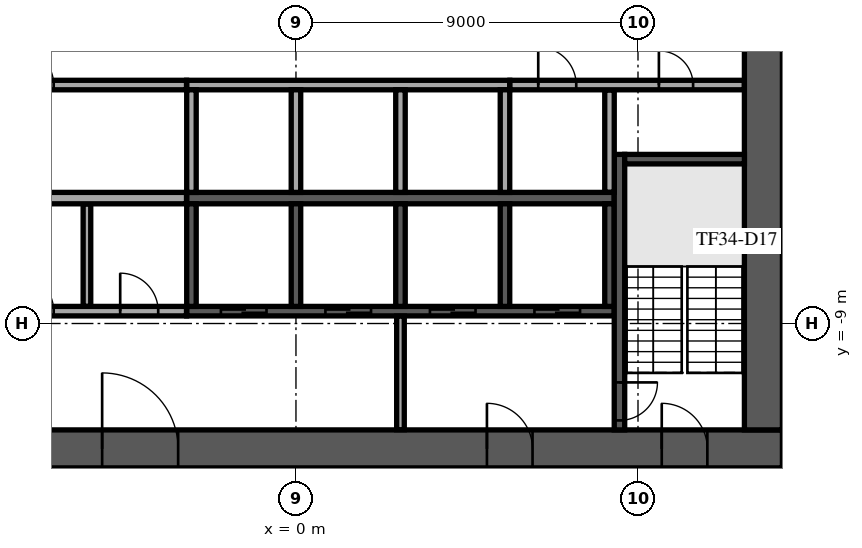
"""IFC4 building model, lengths in metres.
Left out: names, types, materials, properties, quantities, classifications, styles, units other than length and angle.
Written with IfcOpenShell. Run it as: python <this file> out.ifc"""

import sys

from ifc_helpers import new_model, si_unit, direction, frame, frame_2d, origin, place, context, subcontext, project, spatial, rectangle, extrude, element, fill, save


model = new_model("IFC4")
c1 = context("Model", 3, precision=1e-05, world=origin(), true_north=direction((0.0, 1.0)))
c2 = subcontext(c1, "Body", "Model", "MODEL_VIEW")
j1 = project(units=[si_unit("LENGTHUNIT", "METRE"), si_unit("PLANEANGLEUNIT", "RADIAN")], contexts=[c1])
p1 = place(None, origin())
s1 = spatial("IfcSite", under=j1, at=p1, CompositionType="ELEMENT")
p2 = place(p1, origin())
s2 = spatial("IfcBuilding", under=s1, at=p2, CompositionType="ELEMENT")
p3 = place(p2, frame((0.0, 0.0, 147.7)))
s3 = spatial("IfcBuildingStorey", under=s2, at=p3, CompositionType="ELEMENT", Elevation=147.7)
p4 = place(p3, frame((-12.8, -12.3, 0.0), z_axis=(0.0, 0.0, 1.0), x_axis=(1.0, 0.0, 0.0)))
e1 = element("IfcWall", 1, at=p4, inside=s3, PredefinedType="SHEAR", context=c2, shape_type="SweptSolid", body=[
    extrude(rectangle(XDim=25.6, YDim=1.0, at=frame_2d((12.8, 0.0))), origin(), (0.0, 0.0, 1.0), 3.6),
])
p5 = place(p4, frame((7.7, 0.0, 0.0)))
e2 = element("IfcOpeningElement", 2, at=p5, cuts=e1, PredefinedType="OPENING", context=c2, shape_type="SweptSolid", body=[
    extrude(rectangle(XDim=2.0, YDim=2.1, at=frame_2d((1.0, 1.05))), frame((0.0, 0.51, 0.0), z_axis=(0.0, -1.0, 0.0), x_axis=(1.0, 0.0, 0.0)), (0.0, 0.0, 1.0), 1.02),
])
p6 = place(p4, frame((17.825, 0.0, 0.0)))
e3 = element("IfcOpeningElement", 3, at=p6, cuts=e1, PredefinedType="OPENING", context=c2, shape_type="SweptSolid", body=[
    extrude(rectangle(XDim=1.2, YDim=2.1, at=frame_2d((0.6, 1.05))), frame((0.0, 0.51, 0.0), z_axis=(0.0, -1.0, 0.0), x_axis=(1.0, 0.0, 0.0)), (0.0, 0.0, 1.0), 1.02),
])
p7 = place(p4, frame((1.975, 0.0, 0.0)))
e4 = element("IfcOpeningElement", 4, at=p7, cuts=e1, PredefinedType="OPENING", context=c2, shape_type="SweptSolid", body=[
    extrude(rectangle(XDim=1.2, YDim=2.1, at=frame_2d((0.6, 1.05))), frame((0.0, 0.51, 0.0), z_axis=(0.0, -1.0, 0.0), x_axis=(1.0, 0.0, 0.0)), (0.0, 0.0, 1.0), 1.02),
])
p8 = place(p4, frame((22.425, 0.0, 0.0)))
e5 = element("IfcOpeningElement", 5, at=p8, cuts=e1, PredefinedType="OPENING", context=c2, shape_type="SweptSolid", body=[
    extrude(rectangle(XDim=1.2, YDim=2.1, at=frame_2d((0.6, 1.05))), frame((0.0, 0.51, 0.0), z_axis=(0.0, -1.0, 0.0), x_axis=(1.0, 0.0, 0.0)), (0.0, 0.0, 1.0), 1.02),
])
p9 = place(p3, frame((12.3, -11.8, 0.0), z_axis=(0.0, 0.0, 1.0), x_axis=(0.0, 1.0, 0.0)))
e6 = element("IfcWall", 6, at=p9, inside=s3, PredefinedType="SHEAR", context=c2, shape_type="SweptSolid", body=[
    extrude(rectangle(XDim=23.6, YDim=1.0, at=frame_2d((11.8, 0.0))), origin(), (0.0, 0.0, 1.0), 3.6),
])
p10 = place(p9, frame((10.6, 0.0, 0.0)))
e7 = element("IfcOpeningElement", 7, at=p10, cuts=e6, PredefinedType="OPENING", context=c2, shape_type="SweptSolid", body=[
    extrude(rectangle(XDim=2.4, YDim=2.4, at=frame_2d((1.2, 1.2))), frame((0.0, 0.51, 0.0), z_axis=(0.0, -1.0, 0.0), x_axis=(1.0, 0.0, 0.0)), (0.0, 0.0, 1.0), 1.02),
])
p11 = place(p3, frame((-2.875, -5.7, 0.0), z_axis=(0.0, 0.0, 1.0), x_axis=(1.0, 0.0, 0.0)))
e8 = element("IfcWall", 8, at=p11, inside=s3, PredefinedType="SOLIDWALL", context=c2, shape_type="SweptSolid", body=[
    extrude(rectangle(XDim=11.25, YDim=0.3, at=frame_2d((5.625, 0.0))), origin(), (0.0, 0.0, 1.0), 3.6),
])
p12 = place(p3, frame((-2.875, -2.725, 0.0), z_axis=(0.0, 0.0, 1.0), x_axis=(1.0, 0.0, 0.0)))
e9 = element("IfcWall", 9, at=p12, inside=s3, PredefinedType="SOLIDWALL", context=c2, shape_type="SweptSolid", body=[
    extrude(rectangle(XDim=8.5, YDim=0.25, at=frame_2d((4.25, 0.0))), origin(), (0.0, 0.0, 1.0), 3.6),
])
for number, where, z_axis, x_axis in (
    (10, (-2.75, -5.55, 0.0), (0.0, 0.0, 1.0), (0.0, 1.0, 0.0)),
    (11, (0.0, -5.55, 0.0), (0.0, 0.0, 1.0), (0.0, 1.0, 0.0)),
    (12, (2.75, -5.55, 0.0), (0.0, 0.0, 1.0), (0.0, 1.0, 0.0)),
    (13, (5.5, -5.55, 0.0), (0.0, 0.0, 1.0), (0.0, 1.0, 0.0)),
):
    element("IfcWall", number, at=place(p3, frame(where, z_axis=z_axis, x_axis=x_axis)), inside=s3, PredefinedType="SOLIDWALL", context=c2, shape_type="SweptSolid", body=[
        extrude(rectangle(XDim=2.7, YDim=0.25, at=frame_2d((1.35, 0.0))), origin(), (0.0, 0.0, 1.0), 3.6),
    ])
p13 = place(p3, frame((-2.875, -8.675, 0.0), z_axis=(0.0, 0.0, 1.0), x_axis=(1.0, 0.0, 0.0)))
e14 = element("IfcWall", 14, at=p13, inside=s3, PredefinedType="SOLIDWALL", context=c2, shape_type="SweptSolid", body=[
    extrude(rectangle(XDim=11.25, YDim=0.25, at=frame_2d((5.625, 0.0))), origin(), (0.0, 0.0, 1.0), 3.6),
])
p14 = place(p13, frame((0.9, 0.0, 0.0)))
e15 = element("IfcOpeningElement", 15, at=p14, cuts=e14, PredefinedType="OPENING", context=c2, shape_type="SweptSolid", body=[
    extrude(rectangle(XDim=1.2, YDim=2.1, at=frame_2d((0.6, 1.05))), frame((0.0, 0.135, 0.0), z_axis=(0.0, -1.0, 0.0), x_axis=(1.0, 0.0, 0.0)), (0.0, 0.0, 1.0), 0.27),
])
p15 = place(p13, frame((3.65, 0.0, 0.0)))
e16 = element("IfcOpeningElement", 16, at=p15, cuts=e14, PredefinedType="OPENING", context=c2, shape_type="SweptSolid", body=[
    extrude(rectangle(XDim=1.2, YDim=2.1, at=frame_2d((0.6, 1.05))), frame((0.0, 0.135, 0.0), z_axis=(0.0, -1.0, 0.0), x_axis=(1.0, 0.0, 0.0)), (0.0, 0.0, 1.0), 0.27),
])
p16 = place(p13, frame((6.4, 0.0, 0.0)))
e17 = element("IfcOpeningElement", 17, at=p16, cuts=e14, PredefinedType="OPENING", context=c2, shape_type="SweptSolid", body=[
    extrude(rectangle(XDim=1.2, YDim=2.1, at=frame_2d((0.6, 1.05))), frame((0.0, 0.135, 0.0), z_axis=(0.0, -1.0, 0.0), x_axis=(1.0, 0.0, 0.0)), (0.0, 0.0, 1.0), 0.27),
])
p17 = place(p13, frame((9.15, 0.0, 0.0)))
e18 = element("IfcOpeningElement", 18, at=p17, cuts=e14, PredefinedType="OPENING", context=c2, shape_type="SweptSolid", body=[
    extrude(rectangle(XDim=1.2, YDim=2.1, at=frame_2d((0.6, 1.05))), frame((0.0, 0.135, 0.0), z_axis=(0.0, -1.0, 0.0), x_axis=(1.0, 0.0, 0.0)), (0.0, 0.0, 1.0), 0.27),
])
for number, where, z_axis, x_axis in (
    (19, (-2.75, -8.55, 0.0), (0.0, 0.0, 1.0), (0.0, 1.0, 0.0)),
    (20, (0.0, -8.55, 0.0), (0.0, 0.0, 1.0), (0.0, 1.0, 0.0)),
    (21, (2.75, -8.55, 0.0), (0.0, 0.0, 1.0), (0.0, 1.0, 0.0)),
    (22, (5.5, -8.55, 0.0), (0.0, 0.0, 1.0), (0.0, 1.0, 0.0)),
    (23, (8.25, -8.55, 0.0), (0.0, 0.0, 1.0), (0.0, 1.0, 0.0)),
):
    element("IfcWall", number, at=place(p3, frame(where, z_axis=z_axis, x_axis=x_axis)), inside=s3, PredefinedType="SOLIDWALL", context=c2, shape_type="SweptSolid", body=[
        extrude(rectangle(XDim=2.7, YDim=0.25, at=frame_2d((1.35, 0.0))), origin(), (0.0, 0.0, 1.0), 3.6),
    ])
p18 = place(p3, frame((8.512, -4.55, 0.0), z_axis=(0.0, 0.0, 1.0), x_axis=(0.0, -1.0, 0.0)))
e24 = element("IfcWall", 24, at=p18, inside=s3, PredefinedType="SOLIDWALL", context=c2, shape_type="SweptSolid", body=[
    extrude(rectangle(XDim=7.25, YDim=0.275, at=frame_2d((3.625, 0.0))), origin(), (0.0, 0.0, 1.0), 3.6),
])
p19 = place(p18, frame((6.0, 0.0, 0.0)))
e25 = element("IfcOpeningElement", 25, at=p19, cuts=e24, PredefinedType="OPENING", context=c2, shape_type="SweptSolid", body=[
    extrude(rectangle(XDim=1.0, YDim=2.1, at=frame_2d((0.5, 1.05))), frame((0.0, 0.147, 0.0), z_axis=(0.0, -1.0, 0.0), x_axis=(1.0, 0.0, 0.0)), (0.0, 0.0, 1.0), 0.295),
])
p20 = place(p3, frame((8.65, -4.675, 0.0), z_axis=(0.0, 0.0, 1.0), x_axis=(1.0, 0.0, 0.0)))
e26 = element("IfcWall", 26, at=p20, inside=s3, PredefinedType="SOLIDWALL", context=c2, shape_type="SweptSolid", body=[
    extrude(rectangle(XDim=3.15, YDim=0.25, at=frame_2d((1.575, 0.0))), origin(), (0.0, 0.0, 1.0), 3.6),
])
p21 = place(p3, frame((2.75, -11.795, 0.0), z_axis=(0.0, 0.0, 1.0), x_axis=(0.0, 1.0, 0.0)))
e27 = element("IfcWall", 27, at=p21, inside=s3, PredefinedType="PARTITIONING", context=c2, shape_type="SweptSolid", body=[
    extrude(rectangle(XDim=2.99, YDim=0.2, at=frame_2d((1.495, 0.0))), origin(), (0.0, 0.0, 1.0), 3.6),
])
p22 = place(p3, frame((-8.37, -8.675, 0.0), z_axis=(0.0, 0.0, 1.0), x_axis=(1.0, 0.0, 0.0)))
e28 = element("IfcWall", 28, at=p22, inside=s3, PredefinedType="PARTITIONING", context=c2, shape_type="SweptSolid", body=[
    extrude(rectangle(XDim=5.49, YDim=0.25, at=frame_2d((2.745, 0.0))), origin(), (0.0, 0.0, 1.0), 3.6),
])
p23 = place(p22, frame((0.995, 0.0, 0.0)))
e29 = element("IfcOpeningElement", 29, at=p23, cuts=e28, PredefinedType="OPENING", context=c2, shape_type="SweptSolid", body=[
    extrude(rectangle(XDim=1.0, YDim=2.1, at=frame_2d((0.5, 1.05))), frame((0.0, 0.135, 0.0), z_axis=(0.0, -1.0, 0.0), x_axis=(1.0, 0.0, 0.0)), (0.0, 0.0, 1.0), 0.27),
])
p24 = place(p22, frame((3.745, 0.0, 0.0)))
e30 = element("IfcOpeningElement", 30, at=p24, cuts=e28, PredefinedType="OPENING", context=c2, shape_type="SweptSolid", body=[
    extrude(rectangle(XDim=1.0, YDim=2.1, at=frame_2d((0.5, 1.05))), frame((0.0, 0.135, 0.0), z_axis=(0.0, -1.0, 0.0), x_axis=(1.0, 0.0, 0.0)), (0.0, 0.0, 1.0), 0.27),
])
p25 = place(p3, frame((-5.5, -8.545, 0.0), z_axis=(0.0, 0.0, 1.0), x_axis=(0.0, 1.0, 0.0)))
e31 = element("IfcWall", 31, at=p25, inside=s3, PredefinedType="PARTITIONING", context=c2, shape_type="SweptSolid", body=[
    extrude(rectangle(XDim=2.69, YDim=0.2, at=frame_2d((1.345, 0.0))), origin(), (0.0, 0.0, 1.0), 3.6),
])
p26 = place(p3, frame((-8.35, -5.7, 0.0), z_axis=(0.0, 0.0, 1.0), x_axis=(1.0, 0.0, 0.0)))
e32 = element("IfcWall", 32, at=p26, inside=s3, PredefinedType="PARTITIONING", context=c2, shape_type="SweptSolid", body=[
    extrude(rectangle(XDim=5.47, YDim=0.3, at=frame_2d((2.735, 0.0))), origin(), (0.0, 0.0, 1.0), 3.6),
])
p27 = place(p3, frame((8.25, -5.545, 0.0), z_axis=(0.0, 0.0, 1.0), x_axis=(0.0, 1.0, 0.0)))
e33 = element("IfcWall", 33, at=p27, inside=s3, PredefinedType="PARTITIONING", context=c2, shape_type="SweptSolid", body=[
    extrude(rectangle(XDim=2.69, YDim=0.25, at=frame_2d((1.345, 0.0))), origin(), (0.0, 0.0, 1.0), 3.6),
])
p28 = place(p3, frame((-11.795, -2.725, 0.0), z_axis=(0.0, 0.0, 1.0), x_axis=(1.0, 0.0, 0.0)))
e34 = element("IfcWall", 34, at=p28, inside=s3, PredefinedType="PARTITIONING", context=c2, shape_type="SweptSolid", body=[
    extrude(rectangle(XDim=8.915, YDim=0.25, at=frame_2d((4.458, 0.0))), origin(), (0.0, 0.0, 1.0), 3.6),
])
p29 = place(p28, frame((1.295, 0.0, 0.0)))
e35 = element("IfcOpeningElement", 35, at=p29, cuts=e34, PredefinedType="OPENING", context=c2, shape_type="SweptSolid", body=[
    extrude(rectangle(XDim=1.0, YDim=2.1, at=frame_2d((0.5, 1.05))), frame((0.0, 0.135, 0.0), z_axis=(0.0, -1.0, 0.0), x_axis=(1.0, 0.0, 0.0)), (0.0, 0.0, 1.0), 0.27),
])
p30 = place(p28, frame((4.42, 0.0, 0.0)))
e36 = element("IfcOpeningElement", 36, at=p30, cuts=e34, PredefinedType="OPENING", context=c2, shape_type="SweptSolid", body=[
    extrude(rectangle(XDim=1.0, YDim=2.1, at=frame_2d((0.5, 1.05))), frame((0.0, 0.135, 0.0), z_axis=(0.0, -1.0, 0.0), x_axis=(1.0, 0.0, 0.0)), (0.0, 0.0, 1.0), 0.27),
])
p31 = place(p3, frame((5.63, -2.725, 0.0), z_axis=(0.0, 0.0, 1.0), x_axis=(1.0, 0.0, 0.0)))
e37 = element("IfcWall", 37, at=p31, inside=s3, PredefinedType="PARTITIONING", context=c2, shape_type="SweptSolid", body=[
    extrude(rectangle(XDim=6.165, YDim=0.25, at=frame_2d((3.083, 0.0))), origin(), (0.0, 0.0, 1.0), 3.6),
])
p32 = place(p31, frame((0.745, 0.0, 0.0)))
e38 = element("IfcOpeningElement", 38, at=p32, cuts=e37, PredefinedType="OPENING", context=c2, shape_type="SweptSolid", body=[
    extrude(rectangle(XDim=1.0, YDim=2.1, at=frame_2d((0.5, 1.05))), frame((0.0, 0.135, 0.0), z_axis=(0.0, -1.0, 0.0), x_axis=(1.0, 0.0, 0.0)), (0.0, 0.0, 1.0), 0.27),
])
p33 = place(p31, frame((3.92, 0.0, 0.0)))
e39 = element("IfcOpeningElement", 39, at=p33, cuts=e37, PredefinedType="OPENING", context=c2, shape_type="SweptSolid", body=[
    extrude(rectangle(XDim=0.9, YDim=2.1, at=frame_2d((0.45, 1.05))), frame((0.0, 0.135, 0.0), z_axis=(0.0, -1.0, 0.0), x_axis=(1.0, 0.0, 0.0)), (0.0, 0.0, 1.0), 0.27),
])
p34 = place(p3, frame((-7.88, -35.184, 0.0), z_axis=(0.0, 0.0, 1.0), x_axis=(0.857165846238, 0.515040495536, 0.0)))
e40 = element("IfcWall", 40, at=p34, inside=s3, PredefinedType="STANDARD", context=c2, shape_type="SweptSolid", body=[
    extrude(rectangle(XDim=49.751, YDim=0.6, at=frame_2d((24.876, 0.0))), origin(), (0.0, 0.0, 1.0), 3.6),
])
p35 = place(p34, frame((1.161, 0.0, 0.9)))
e41 = element("IfcOpeningElement", 41, at=p35, cuts=e40, PredefinedType="OPENING", context=c2, shape_type="SweptSolid", body=[
    extrude(rectangle(XDim=2.1, YDim=2.1, at=frame_2d((1.05, 1.05))), frame((0.0, 0.31, 0.0), z_axis=(0.0, -1.0, 0.0), x_axis=(1.0, 0.0, 0.0)), (0.0, 0.0, 1.0), 0.62),
])
p36 = place(p34, frame((5.644, 0.0, 0.9)))
e42 = element("IfcOpeningElement", 42, at=p36, cuts=e40, PredefinedType="OPENING", context=c2, shape_type="SweptSolid", body=[
    extrude(rectangle(XDim=2.1, YDim=2.1, at=frame_2d((1.05, 1.05))), frame((0.0, 0.31, 0.0), z_axis=(0.0, -1.0, 0.0), x_axis=(1.0, 0.0, 0.0)), (0.0, 0.0, 1.0), 0.62),
])
p37 = place(p34, frame((10.189, 0.0, 0.9)))
e43 = element("IfcOpeningElement", 43, at=p37, cuts=e40, PredefinedType="OPENING", context=c2, shape_type="SweptSolid", body=[
    extrude(rectangle(XDim=2.1, YDim=2.1, at=frame_2d((1.05, 1.05))), frame((0.0, 0.31, 0.0), z_axis=(0.0, -1.0, 0.0), x_axis=(1.0, 0.0, 0.0)), (0.0, 0.0, 1.0), 0.62),
])
p38 = place(p34, frame((14.735, 0.0, 0.9)))
e44 = element("IfcOpeningElement", 44, at=p38, cuts=e40, PredefinedType="OPENING", context=c2, shape_type="SweptSolid", body=[
    extrude(rectangle(XDim=2.1, YDim=2.1, at=frame_2d((1.05, 1.05))), frame((0.0, 0.31, 0.0), z_axis=(0.0, -1.0, 0.0), x_axis=(1.0, 0.0, 0.0)), (0.0, 0.0, 1.0), 0.62),
])
p39 = place(p34, frame((19.28, 0.0, 0.9)))
e45 = element("IfcOpeningElement", 45, at=p39, cuts=e40, PredefinedType="OPENING", context=c2, shape_type="SweptSolid", body=[
    extrude(rectangle(XDim=2.1, YDim=2.1, at=frame_2d((1.05, 1.05))), frame((0.0, 0.31, 0.0), z_axis=(0.0, -1.0, 0.0), x_axis=(1.0, 0.0, 0.0)), (0.0, 0.0, 1.0), 0.62),
])
p40 = place(p34, frame((23.826, 0.0, 0.9)))
e46 = element("IfcOpeningElement", 46, at=p40, cuts=e40, PredefinedType="OPENING", context=c2, shape_type="SweptSolid", body=[
    extrude(rectangle(XDim=2.1, YDim=2.1, at=frame_2d((1.05, 1.05))), frame((0.0, 0.31, 0.0), z_axis=(0.0, -1.0, 0.0), x_axis=(1.0, 0.0, 0.0)), (0.0, 0.0, 1.0), 0.62),
])
p41 = place(p34, frame((28.371, 0.0, 0.9)))
e47 = element("IfcOpeningElement", 47, at=p41, cuts=e40, PredefinedType="OPENING", context=c2, shape_type="SweptSolid", body=[
    extrude(rectangle(XDim=2.1, YDim=2.1, at=frame_2d((1.05, 1.05))), frame((0.0, 0.31, 0.0), z_axis=(0.0, -1.0, 0.0), x_axis=(1.0, 0.0, 0.0)), (0.0, 0.0, 1.0), 0.62),
])
p42 = place(p34, frame((32.917, 0.0, 0.9)))
e48 = element("IfcOpeningElement", 48, at=p42, cuts=e40, PredefinedType="OPENING", context=c2, shape_type="SweptSolid", body=[
    extrude(rectangle(XDim=2.1, YDim=2.1, at=frame_2d((1.05, 1.05))), frame((0.0, 0.31, 0.0), z_axis=(0.0, -1.0, 0.0), x_axis=(1.0, 0.0, 0.0)), (0.0, 0.0, 1.0), 0.62),
])
p43 = place(p34, frame((37.462, 0.0, 0.9)))
e49 = element("IfcOpeningElement", 49, at=p43, cuts=e40, PredefinedType="OPENING", context=c2, shape_type="SweptSolid", body=[
    extrude(rectangle(XDim=2.1, YDim=2.1, at=frame_2d((1.05, 1.05))), frame((0.0, 0.31, 0.0), z_axis=(0.0, -1.0, 0.0), x_axis=(1.0, 0.0, 0.0)), (0.0, 0.0, 1.0), 0.62),
])
p44 = place(p34, frame((42.008, 0.0, 0.9)))
e50 = element("IfcOpeningElement", 50, at=p44, cuts=e40, PredefinedType="OPENING", context=c2, shape_type="SweptSolid", body=[
    extrude(rectangle(XDim=2.1, YDim=2.1, at=frame_2d((1.05, 1.05))), frame((0.0, 0.31, 0.0), z_axis=(0.0, -1.0, 0.0), x_axis=(1.0, 0.0, 0.0)), (0.0, 0.0, 1.0), 0.62),
])
p45 = place(p34, frame((46.491, 0.0, 0.9)))
e51 = element("IfcOpeningElement", 51, at=p45, cuts=e40, PredefinedType="OPENING", context=c2, shape_type="SweptSolid", body=[
    extrude(rectangle(XDim=2.1, YDim=2.1, at=frame_2d((1.05, 1.05))), frame((0.0, 0.31, 0.0), z_axis=(0.0, -1.0, 0.0), x_axis=(1.0, 0.0, 0.0)), (0.0, 0.0, 1.0), 0.62),
])
p46 = place(p3, frame((-4.341, -24.661, 0.0), z_axis=(0.0, 0.0, 1.0), x_axis=(0.85716751976, 0.515037710336, 0.0)))
e52 = element("IfcWall", 52, at=p46, inside=s3, PredefinedType="PARTITIONING", context=c2, shape_type="SweptSolid", body=[
    extrude(rectangle(XDim=32.919, YDim=0.15, at=frame_2d((16.459, 0.0))), origin(), (0.0, 0.0, 1.0), 3.15),
])
p47 = place(p46, frame((11.932, 0.0, 0.0)))
e53 = element("IfcOpeningElement", 53, at=p47, cuts=e52, PredefinedType="OPENING", context=c2, shape_type="SweptSolid", body=[
    extrude(rectangle(XDim=1.0, YDim=2.1, at=frame_2d((0.5, 1.05))), frame((0.0, 0.085, 0.0), z_axis=(0.0, -1.0, 0.0), x_axis=(1.0, 0.0, 0.0)), (0.0, 0.0, 1.0), 0.17),
])
p48 = place(p46, frame((25.18, 0.0, 0.0)))
e54 = element("IfcOpeningElement", 54, at=p48, cuts=e52, PredefinedType="OPENING", context=c2, shape_type="SweptSolid", body=[
    extrude(rectangle(XDim=1.0, YDim=2.1, at=frame_2d((0.5, 1.05))), frame((0.0, 0.085, 0.0), z_axis=(0.0, -1.0, 0.0), x_axis=(1.0, 0.0, 0.0)), (0.0, 0.0, 1.0), 0.17),
])
p49 = place(p46, frame((30.035, 0.0, 0.0)))
e55 = element("IfcOpeningElement", 55, at=p49, cuts=e52, PredefinedType="OPENING", context=c2, shape_type="SweptSolid", body=[
    extrude(rectangle(XDim=1.0, YDim=2.1, at=frame_2d((0.5, 1.05))), frame((0.0, 0.085, 0.0), z_axis=(0.0, -1.0, 0.0), x_axis=(1.0, 0.0, 0.0)), (0.0, 0.0, 1.0), 0.17),
])
p50 = place(p5, origin())
e56 = element("IfcDoor", 56, at=p50, inside=s3, OperationType="SINGLE_SWING_LEFT", PredefinedType="DOOR", context=c2, shape_type="SweptSolid", body=[
    extrude(rectangle(XDim=2.0, YDim=2.1, at=frame_2d((1.0, 1.05))), frame((0.0, 0.025, 0.0), z_axis=(0.0, -1.0, 0.0), x_axis=(1.0, 0.0, 0.0)), (0.0, 0.0, 1.0), 0.05),
])
fill(e2, e56)
p51 = place(p6, origin())
e57 = element("IfcDoor", 57, at=p51, inside=s3, OperationType="SINGLE_SWING_LEFT", PredefinedType="DOOR", context=c2, shape_type="SweptSolid", body=[
    extrude(rectangle(XDim=1.2, YDim=2.1, at=frame_2d((0.6, 1.05))), frame((0.0, 0.025, 0.0), z_axis=(0.0, -1.0, 0.0), x_axis=(1.0, 0.0, 0.0)), (0.0, 0.0, 1.0), 0.05),
])
fill(e3, e57)
p52 = place(p8, origin())
e58 = element("IfcDoor", 58, at=p52, inside=s3, OperationType="SINGLE_SWING_LEFT", PredefinedType="DOOR", context=c2, shape_type="SweptSolid", body=[
    extrude(rectangle(XDim=1.2, YDim=2.1, at=frame_2d((0.6, 1.05))), frame((0.0, 0.025, 0.0), z_axis=(0.0, -1.0, 0.0), x_axis=(1.0, 0.0, 0.0)), (0.0, 0.0, 1.0), 0.05),
])
fill(e5, e58)
p53 = place(p14, origin())
e59 = element("IfcDoor", 59, at=p53, inside=s3, OperationType="DOUBLE_DOOR_SLIDING", PredefinedType="DOOR", context=c2, shape_type="SweptSolid", body=[
    extrude(rectangle(XDim=1.2, YDim=2.1, at=frame_2d((0.6, 1.05))), frame((0.0, 0.025, 0.0), z_axis=(0.0, -1.0, 0.0), x_axis=(1.0, 0.0, 0.0)), (0.0, 0.0, 1.0), 0.05),
])
fill(e15, e59)
p54 = place(p15, origin())
e60 = element("IfcDoor", 60, at=p54, inside=s3, OperationType="DOUBLE_DOOR_SLIDING", PredefinedType="DOOR", context=c2, shape_type="SweptSolid", body=[
    extrude(rectangle(XDim=1.2, YDim=2.1, at=frame_2d((0.6, 1.05))), frame((0.0, 0.025, 0.0), z_axis=(0.0, -1.0, 0.0), x_axis=(1.0, 0.0, 0.0)), (0.0, 0.0, 1.0), 0.05),
])
fill(e16, e60)
p55 = place(p16, origin())
e61 = element("IfcDoor", 61, at=p55, inside=s3, OperationType="DOUBLE_DOOR_SLIDING", PredefinedType="DOOR", context=c2, shape_type="SweptSolid", body=[
    extrude(rectangle(XDim=1.2, YDim=2.1, at=frame_2d((0.6, 1.05))), frame((0.0, 0.025, 0.0), z_axis=(0.0, -1.0, 0.0), x_axis=(1.0, 0.0, 0.0)), (0.0, 0.0, 1.0), 0.05),
])
fill(e17, e61)
p56 = place(p17, origin())
e62 = element("IfcDoor", 62, at=p56, inside=s3, OperationType="DOUBLE_DOOR_SLIDING", PredefinedType="DOOR", context=c2, shape_type="SweptSolid", body=[
    extrude(rectangle(XDim=1.2, YDim=2.1, at=frame_2d((0.6, 1.05))), frame((0.0, 0.025, 0.0), z_axis=(0.0, -1.0, 0.0), x_axis=(1.0, 0.0, 0.0)), (0.0, 0.0, 1.0), 0.05),
])
fill(e18, e62)
p57 = place(p19, origin())
e63 = element("IfcDoor", 63, at=p57, inside=s3, OperationType="SINGLE_SWING_LEFT", PredefinedType="DOOR", context=c2, shape_type="SweptSolid", body=[
    extrude(rectangle(XDim=1.0, YDim=2.1, at=frame_2d((0.5, 1.05))), frame((0.0, 0.025, 0.0), z_axis=(0.0, -1.0, 0.0), x_axis=(1.0, 0.0, 0.0)), (0.0, 0.0, 1.0), 0.05),
])
fill(e25, e63)
p58 = place(p23, origin())
e64 = element("IfcDoor", 64, at=p58, inside=s3, OperationType="SINGLE_SWING_LEFT", PredefinedType="DOOR", context=c2, shape_type="SweptSolid", body=[
    extrude(rectangle(XDim=1.0, YDim=2.1, at=frame_2d((0.5, 1.05))), frame((0.0, 0.025, 0.0), z_axis=(0.0, -1.0, 0.0), x_axis=(1.0, 0.0, 0.0)), (0.0, 0.0, 1.0), 0.05),
])
fill(e29, e64)
p59 = place(p24, origin())
e65 = element("IfcDoor", 65, at=p59, inside=s3, OperationType="SINGLE_SWING_LEFT", PredefinedType="DOOR", context=c2, shape_type="SweptSolid", body=[
    extrude(rectangle(XDim=1.0, YDim=2.1, at=frame_2d((0.5, 1.05))), frame((0.0, 0.025, 0.0), z_axis=(0.0, -1.0, 0.0), x_axis=(1.0, 0.0, 0.0)), (0.0, 0.0, 1.0), 0.05),
])
fill(e30, e65)
p60 = place(p32, origin())
e66 = element("IfcDoor", 66, at=p60, inside=s3, OperationType="SINGLE_SWING_LEFT", PredefinedType="DOOR", context=c2, shape_type="SweptSolid", body=[
    extrude(rectangle(XDim=1.0, YDim=2.1, at=frame_2d((0.5, 1.05))), frame((0.0, 0.025, 0.0), z_axis=(0.0, -1.0, 0.0), x_axis=(1.0, 0.0, 0.0)), (0.0, 0.0, 1.0), 0.05),
])
fill(e38, e66)
p61 = place(p33, origin())
e67 = element("IfcDoor", 67, at=p61, inside=s3, OperationType="SINGLE_SWING_LEFT", PredefinedType="DOOR", context=c2, shape_type="SweptSolid", body=[
    extrude(rectangle(XDim=0.9, YDim=2.1, at=frame_2d((0.45, 1.05))), frame((0.0, 0.025, 0.0), z_axis=(0.0, -1.0, 0.0), x_axis=(1.0, 0.0, 0.0)), (0.0, 0.0, 1.0), 0.05),
])
fill(e39, e67)
p62 = place(p30, origin())
e68 = element("IfcDoor", 68, at=p62, inside=s3, OperationType="SINGLE_SWING_LEFT", PredefinedType="DOOR", context=c2, shape_type="SweptSolid", body=[
    extrude(rectangle(XDim=1.0, YDim=2.1, at=frame_2d((0.5, 1.05))), frame((0.0, 0.025, 0.0), z_axis=(0.0, -1.0, 0.0), x_axis=(1.0, 0.0, 0.0)), (0.0, 0.0, 1.0), 0.05),
])
fill(e36, e68)
save(model, sys.argv[1])
